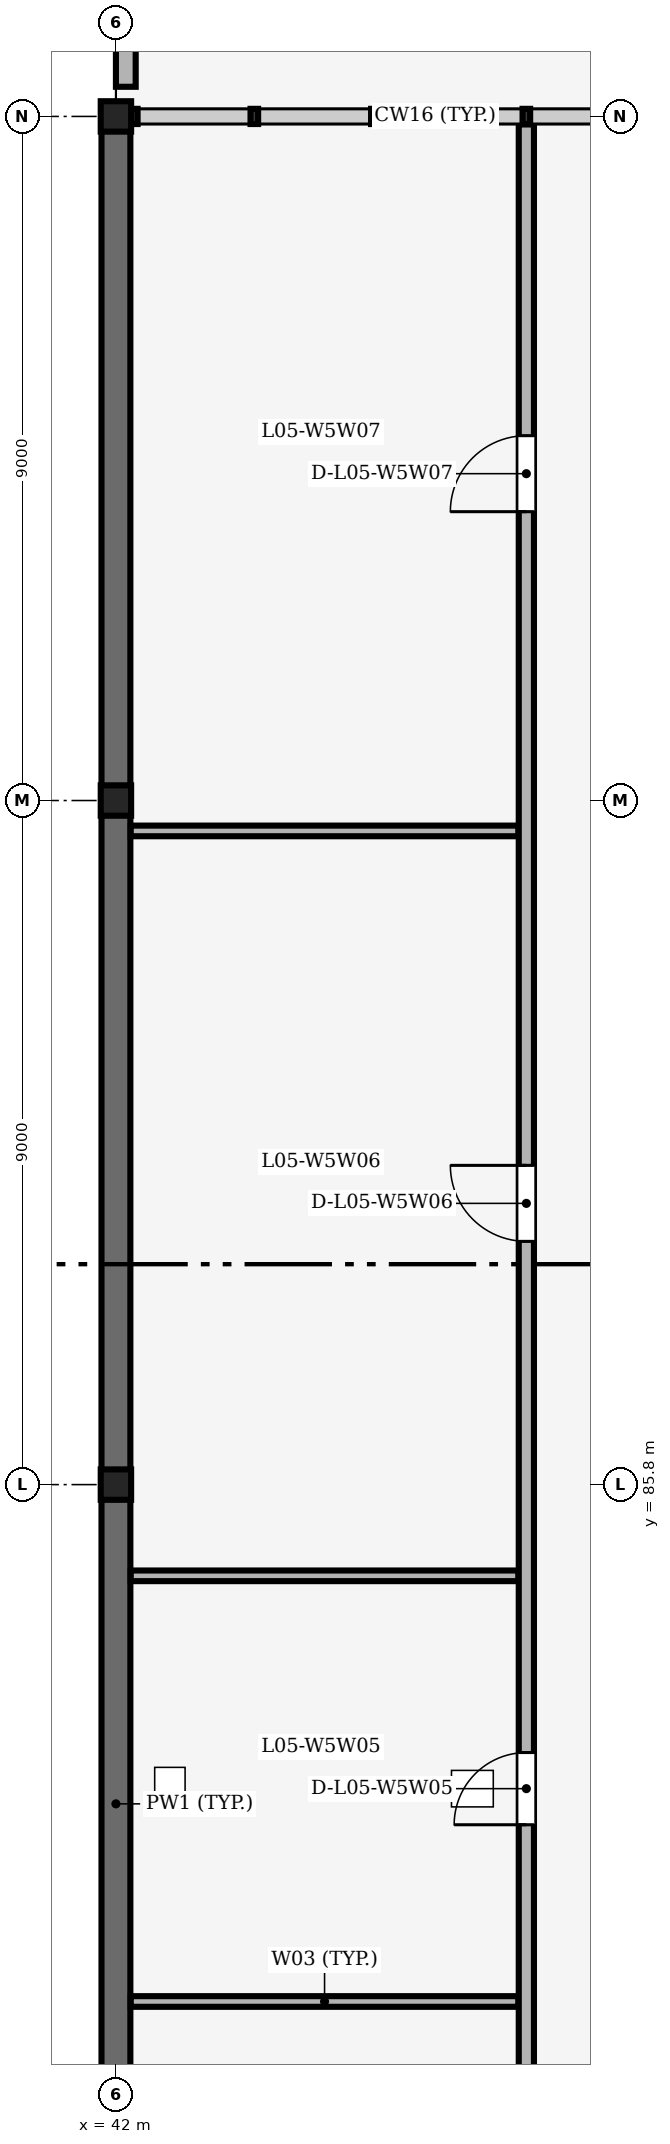
"""IFC4 building model, lengths in metres.
Left out: names, types, materials, properties, quantities, classifications, styles, units other than length and angle.
Written with IfcOpenShell. Run it as: python <this file> out.ifc"""

import sys

from ifc_helpers import new_model, si_unit, direction, frame, frame_2d, origin, origin_2d, place, context, subcontext, project, spatial, rectangle, extrude, element, fill, save


model = new_model("IFC4")
c1 = context("Model", 3, precision=1e-05, world=origin(), true_north=direction((0.0, 1.0)))
c2 = subcontext(c1, "Body", "Model", "MODEL_VIEW")
j1 = project(units=[si_unit("LENGTHUNIT", "METRE"), si_unit("PLANEANGLEUNIT", "RADIAN")], contexts=[c1])
p1 = place(None, origin())
s1 = spatial("IfcSite", under=j1, at=p1, CompositionType="ELEMENT")
p2 = place(p1, origin())
s2 = spatial("IfcBuilding", under=s1, at=p2, CompositionType="ELEMENT")
p3 = place(p2, frame((0.0, 0.0, 21.6)))
s3 = spatial("IfcBuildingStorey", under=s2, at=p3, CompositionType="ELEMENT", Elevation=21.6)
for number, where, z_axis, x_axis in (
    (1, (42.0, 85.8, 0.0), (0.0, 0.0, 1.0), (1.0, 0.0, 0.0)),
    (2, (42.0, 94.8, 0.0), (0.0, 0.0, 1.0), (1.0, 0.0, 0.0)),
    (3, (42.0, 103.8, 0.0), (0.0, 0.0, 1.0), (1.0, 0.0, 0.0)),
):
    element("IfcColumn", number, at=place(p3, frame(where, z_axis=z_axis, x_axis=x_axis)), inside=s3, PredefinedType="COLUMN", context=c2, shape_type="SweptSolid", body=[
        extrude(rectangle(XDim=0.4, YDim=0.4, at=origin_2d()), origin(), (0.0, 0.0, 1.0), 4.2),
    ])
p4 = place(p3, frame((42.0, 77.575, 0.0), z_axis=(0.0, 0.0, 1.0), x_axis=(0.0, 1.0, 0.0)))
e4 = element("IfcWall", 4, at=p4, inside=s3, PredefinedType="SHEAR", context=c2, shape_type="SweptSolid", body=[
    extrude(rectangle(XDim=8.05, YDim=0.38, at=frame_2d((4.025, 0.0))), origin(), (0.0, 0.0, 1.0), 3.48),
])
p5 = place(p3, frame((42.0, 85.975, 0.0), z_axis=(0.0, 0.0, 1.0), x_axis=(0.0, 1.0, 0.0)))
e5 = element("IfcWall", 5, at=p5, inside=s3, PredefinedType="SHEAR", context=c2, shape_type="SweptSolid", body=[
    extrude(rectangle(XDim=8.65, YDim=0.38, at=frame_2d((4.325, 0.0))), origin(), (0.0, 0.0, 1.0), 3.43),
])
p6 = place(p3, frame((42.0, 94.975, 0.0), z_axis=(0.0, 0.0, 1.0), x_axis=(0.0, 1.0, 0.0)))
e6 = element("IfcWall", 6, at=p6, inside=s3, PredefinedType="SHEAR", context=c2, shape_type="SweptSolid", body=[
    extrude(rectangle(XDim=8.65, YDim=0.38, at=frame_2d((4.325, 0.0))), origin(), (0.0, 0.0, 1.0), 3.48),
])
p7 = place(p3, frame((42.13, 104.19, 0.0), z_axis=(0.0, 0.0, 1.0), x_axis=(0.0, 1.0, 0.0)))
e7 = element("IfcWall", 7, at=p7, inside=s3, PredefinedType="PARAPET", context=c2, shape_type="SweptSolid", body=[
    extrude(rectangle(XDim=8.22, YDim=0.26, at=frame_2d((4.11, 0.0))), origin(), (0.0, 0.0, 1.0), 0.85),
])
for number, where, z_axis, x_axis in (
    (8, (42.195, 79.0, 0.0), (0.0, 0.0, 1.0), (1.0, 0.0, 0.0)),
    (9, (42.195, 84.6, 0.0), (0.0, 0.0, 1.0), (1.0, 0.0, 0.0)),
):
    element("IfcWall", number, at=place(p3, frame(where, z_axis=z_axis, x_axis=x_axis)), inside=s3, PredefinedType="PARTITIONING", context=c2, shape_type="SweptSolid", body=[
        extrude(rectangle(XDim=5.1, YDim=0.14, at=frame_2d((2.55, 0.0))), origin(), (0.0, 0.0, 1.0), 3.9),
    ])
p8 = place(p3, frame((42.195, 94.4, 0.0), z_axis=(0.0, 0.0, 1.0), x_axis=(1.0, 0.0, 0.0)))
e10 = element("IfcWall", 10, at=p8, inside=s3, PredefinedType="PARTITIONING", context=c2, shape_type="SweptSolid", body=[
    extrude(rectangle(XDim=5.1, YDim=0.14, at=frame_2d((2.55, 0.0))), origin(), (0.0, 0.0, 1.0), 3.43),
])
p9 = place(p3, frame((47.4, 43.965, 0.0), z_axis=(0.0, 0.0, 1.0), x_axis=(0.0, 1.0, 0.0)))
e11 = element("IfcWall", 11, at=p9, inside=s3, PredefinedType="PARTITIONING", context=c2, shape_type="SweptSolid", body=[
    extrude(rectangle(XDim=59.73, YDim=0.2, at=frame_2d((29.865, 0.0))), origin(), (0.0, 0.0, 1.0), 3.9),
])
p10 = place(p9, frame((5.335, 0.0, 0.0)))
e12 = element("IfcOpeningElement", 12, at=p10, cuts=e11, PredefinedType="OPENING", context=c2, shape_type="SweptSolid", body=[
    extrude(rectangle(XDim=1.0, YDim=2.15, at=frame_2d((0.5, 1.075))), frame((0.0, 0.11, 0.0), z_axis=(0.0, -1.0, 0.0), x_axis=(1.0, 0.0, 0.0)), (0.0, 0.0, 1.0), 0.22),
])
p11 = place(p9, frame((17.335, 0.0, 0.0)))
e13 = element("IfcOpeningElement", 13, at=p11, cuts=e11, PredefinedType="OPENING", context=c2, shape_type="SweptSolid", body=[
    extrude(rectangle(XDim=1.0, YDim=2.15, at=frame_2d((0.5, 1.075))), frame((0.0, 0.11, 0.0), z_axis=(0.0, -1.0, 0.0), x_axis=(1.0, 0.0, 0.0)), (0.0, 0.0, 1.0), 0.22),
])
p12 = place(p9, frame((26.16, 0.0, 0.0)))
e14 = element("IfcOpeningElement", 14, at=p12, cuts=e11, PredefinedType="OPENING", context=c2, shape_type="SweptSolid", body=[
    extrude(rectangle(XDim=0.95, YDim=2.2, at=frame_2d((0.475, 1.1))), frame((0.0, 0.11, 0.0), z_axis=(0.0, -1.0, 0.0), x_axis=(1.0, 0.0, 0.0)), (0.0, 0.0, 1.0), 0.22),
])
p13 = place(p9, frame((31.76, 0.0, 0.0)))
e15 = element("IfcOpeningElement", 15, at=p13, cuts=e11, PredefinedType="OPENING", context=c2, shape_type="SweptSolid", body=[
    extrude(rectangle(XDim=0.95, YDim=2.2, at=frame_2d((0.475, 1.1))), frame((0.0, 0.11, 0.0), z_axis=(0.0, -1.0, 0.0), x_axis=(1.0, 0.0, 0.0)), (0.0, 0.0, 1.0), 0.22),
])
p14 = place(p9, frame((37.36, 0.0, 0.0)))
e16 = element("IfcOpeningElement", 16, at=p14, cuts=e11, PredefinedType="OPENING", context=c2, shape_type="SweptSolid", body=[
    extrude(rectangle(XDim=0.95, YDim=2.1, at=frame_2d((0.475, 1.05))), frame((0.0, 0.11, 0.0), z_axis=(0.0, -1.0, 0.0), x_axis=(1.0, 0.0, 0.0)), (0.0, 0.0, 1.0), 0.22),
])
p15 = place(p9, frame((45.035, 0.0, 0.0)))
e17 = element("IfcOpeningElement", 17, at=p15, cuts=e11, PredefinedType="OPENING", context=c2, shape_type="SweptSolid", body=[
    extrude(rectangle(XDim=1.0, YDim=2.15, at=frame_2d((0.5, 1.075))), frame((0.0, 0.11, 0.0), z_axis=(0.0, -1.0, 0.0), x_axis=(1.0, 0.0, 0.0)), (0.0, 0.0, 1.0), 0.22),
])
p16 = place(p9, frame((54.635, 0.0, 0.0)))
e18 = element("IfcOpeningElement", 18, at=p16, cuts=e11, PredefinedType="OPENING", context=c2, shape_type="SweptSolid", body=[
    extrude(rectangle(XDim=1.0, YDim=2.15, at=frame_2d((0.5, 1.075))), frame((0.0, 0.11, 0.0), z_axis=(0.0, -1.0, 0.0), x_axis=(1.0, 0.0, 0.0)), (0.0, 0.0, 1.0), 0.22),
])
p17 = place(p14, origin())
e19 = element("IfcDoor", 19, at=p17, inside=s3, OperationType="SINGLE_SWING_LEFT", PredefinedType="DOOR", context=c2, shape_type="SweptSolid", body=[
    extrude(rectangle(XDim=0.95, YDim=2.1, at=frame_2d((0.475, 1.05))), frame((0.0, 0.025, 0.0), z_axis=(0.0, -1.0, 0.0), x_axis=(1.0, 0.0, 0.0)), (0.0, 0.0, 1.0), 0.05),
])
fill(e16, e19)
p18 = place(p15, origin())
e20 = element("IfcDoor", 20, at=p18, inside=s3, OperationType="SINGLE_SWING_RIGHT", PredefinedType="DOOR", context=c2, shape_type="SweptSolid", body=[
    extrude(rectangle(XDim=1.0, YDim=2.15, at=frame_2d((0.5, 1.075))), frame((0.0, 0.025, 0.0), z_axis=(0.0, -1.0, 0.0), x_axis=(1.0, 0.0, 0.0)), (0.0, 0.0, 1.0), 0.05),
])
fill(e17, e20)
p19 = place(p16, origin())
e21 = element("IfcDoor", 21, at=p19, inside=s3, OperationType="SINGLE_SWING_LEFT", PredefinedType="DOOR", context=c2, shape_type="SweptSolid", body=[
    extrude(rectangle(XDim=1.0, YDim=2.15, at=frame_2d((0.5, 1.075))), frame((0.0, 0.025, 0.0), z_axis=(0.0, -1.0, 0.0), x_axis=(1.0, 0.0, 0.0)), (0.0, 0.0, 1.0), 0.05),
])
fill(e18, e21)
save(model, sys.argv[1])
